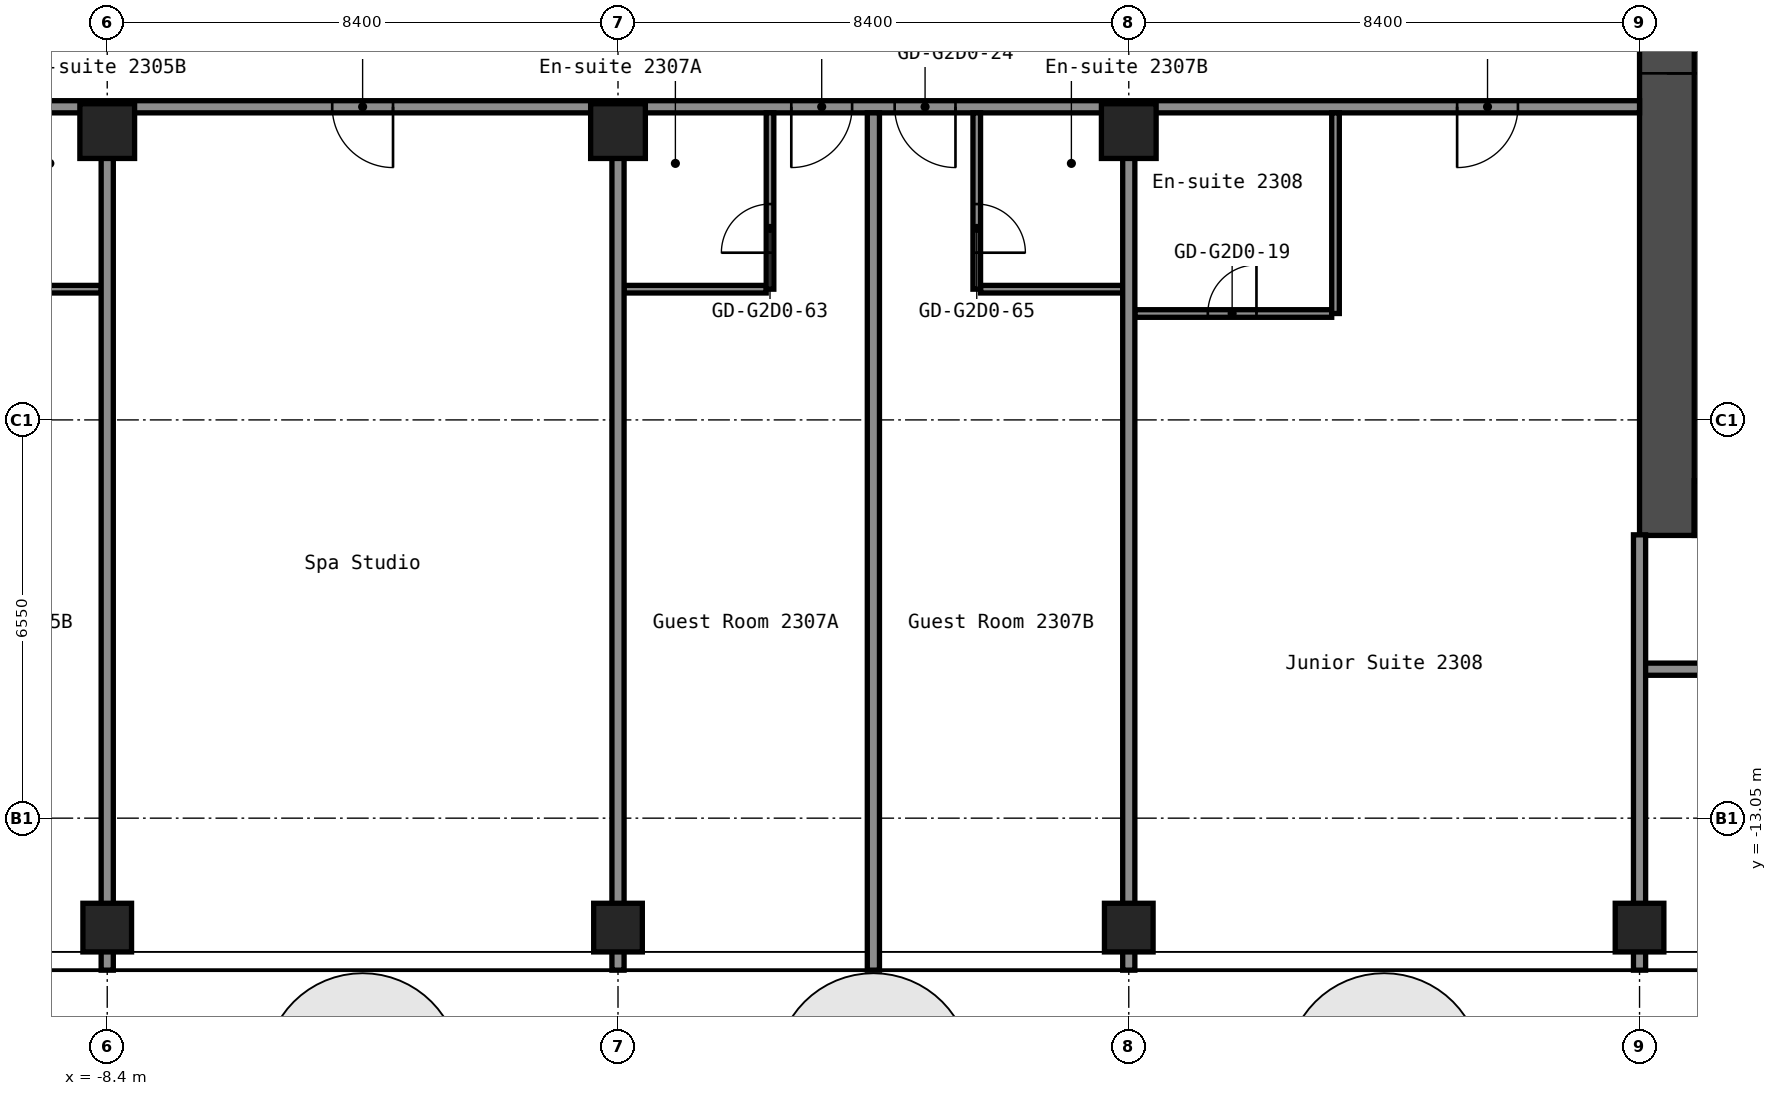
"""IFC4 building model, lengths in metres.
Left out: names, types, materials, properties, quantities, classifications, styles, units other than length and angle.
Written with IfcOpenShell. Run it as: python <this file> out.ifc"""

import sys

from ifc_helpers import new_model, si_unit, direction, frame, frame_2d, origin, origin_2d, place, context, subcontext, project, spatial, rectangle, hollow_rectangle, extrude, element, fill, save


model = new_model("IFC4")
c1 = context("Model", 3, precision=1e-05, world=origin(), true_north=direction((0.0, 1.0)))
c2 = subcontext(c1, "Body", "Model", "MODEL_VIEW")
j1 = project(units=[si_unit("LENGTHUNIT", "METRE"), si_unit("PLANEANGLEUNIT", "RADIAN")], contexts=[c1])
p1 = place(None, origin())
s1 = spatial("IfcSite", under=j1, at=p1, CompositionType="ELEMENT")
p2 = place(p1, origin())
s2 = spatial("IfcBuilding", under=s1, at=p2, CompositionType="ELEMENT")
p3 = place(p2, frame((0.0, 0.0, 85.0)))
s3 = spatial("IfcBuildingStorey", under=s2, at=p3, CompositionType="ELEMENT", Elevation=85.0)
p4 = place(p3, frame((-8.4, -14.85, 0.0), z_axis=(0.0, 0.0, 1.0), x_axis=(1.0, 0.0, 0.0)))
e1 = element("IfcColumn", 1, at=p4, inside=s3, PredefinedType="COLUMN", context=c2, shape_type="SweptSolid", body=[
    extrude(hollow_rectangle(XDim=0.8, YDim=0.8, WallThickness=0.032, at=origin_2d()), origin(), (0.0, 0.0, 1.0), 2.8),
])
p5 = place(p3, frame((-8.4, -1.75, 0.0), z_axis=(0.0, 0.0, 1.0), x_axis=(1.0, 0.0, 0.0)))
e2 = element("IfcColumn", 2, at=p5, inside=s3, PredefinedType="COLUMN", context=c2, shape_type="SweptSolid", body=[
    extrude(hollow_rectangle(XDim=0.9, YDim=0.9, WallThickness=0.036, at=origin_2d()), origin(), (0.0, 0.0, 1.0), 2.8),
])
p6 = place(p3, frame((0.0, -14.85, 0.0), z_axis=(0.0, 0.0, 1.0), x_axis=(1.0, 0.0, 0.0)))
e3 = element("IfcColumn", 3, at=p6, inside=s3, PredefinedType="COLUMN", context=c2, shape_type="SweptSolid", body=[
    extrude(hollow_rectangle(XDim=0.8, YDim=0.8, WallThickness=0.032, at=origin_2d()), origin(), (0.0, 0.0, 1.0), 2.8),
])
p7 = place(p3, frame((0.0, -1.75, 0.0), z_axis=(0.0, 0.0, 1.0), x_axis=(1.0, 0.0, 0.0)))
e4 = element("IfcColumn", 4, at=p7, inside=s3, PredefinedType="COLUMN", context=c2, shape_type="SweptSolid", body=[
    extrude(hollow_rectangle(XDim=0.9, YDim=0.9, WallThickness=0.036, at=origin_2d()), origin(), (0.0, 0.0, 1.0), 2.8),
])
p8 = place(p3, frame((8.4, -14.85, 0.0), z_axis=(0.0, 0.0, 1.0), x_axis=(1.0, 0.0, 0.0)))
e5 = element("IfcColumn", 5, at=p8, inside=s3, PredefinedType="COLUMN", context=c2, shape_type="SweptSolid", body=[
    extrude(hollow_rectangle(XDim=0.8, YDim=0.8, WallThickness=0.032, at=origin_2d()), origin(), (0.0, 0.0, 1.0), 2.8),
])
p9 = place(p3, frame((8.4, -1.75, 0.0), z_axis=(0.0, 0.0, 1.0), x_axis=(1.0, 0.0, 0.0)))
e6 = element("IfcColumn", 6, at=p9, inside=s3, PredefinedType="COLUMN", context=c2, shape_type="SweptSolid", body=[
    extrude(hollow_rectangle(XDim=0.9, YDim=0.9, WallThickness=0.036, at=origin_2d()), origin(), (0.0, 0.0, 1.0), 2.8),
])
p10 = place(p3, frame((16.8, -14.85, 0.0), z_axis=(0.0, 0.0, 1.0), x_axis=(1.0, 0.0, 0.0)))
e7 = element("IfcColumn", 7, at=p10, inside=s3, PredefinedType="COLUMN", context=c2, shape_type="SweptSolid", body=[
    extrude(hollow_rectangle(XDim=0.8, YDim=0.8, WallThickness=0.032, at=origin_2d()), origin(), (0.0, 0.0, 1.0), 2.8),
])
p11 = place(p3, frame((17.25, -8.4, 0.0), z_axis=(0.0, 0.0, 1.0), x_axis=(0.0, 1.0, 0.0)))
e8 = element("IfcWall", 8, at=p11, inside=s3, PredefinedType="SHEAR", context=c2, shape_type="SweptSolid", body=[
    extrude(rectangle(XDim=16.8, YDim=0.9, at=frame_2d((8.4, 0.0))), origin(), (0.0, 0.0, 1.0), 2.8),
])
p12 = place(p11, frame((7.6, 0.0, 0.0)))
e9 = element("IfcOpeningElement", 9, at=p12, cuts=e8, PredefinedType="OPENING", context=c2, shape_type="SweptSolid", body=[
    extrude(rectangle(XDim=1.2, YDim=2.1, at=frame_2d((0.6, 1.05))), frame((0.0, 0.46, 0.0), z_axis=(0.0, -1.0, 0.0), x_axis=(1.0, 0.0, 0.0)), (0.0, 0.0, 1.0), 0.92),
])
p13 = place(p3, frame((17.7, -7.95, 0.0), z_axis=(0.0, 0.0, 1.0), x_axis=(1.0, 0.0, 0.0)))
e10 = element("IfcWall", 10, at=p13, inside=s3, PredefinedType="SHEAR", context=c2, shape_type="SweptSolid", body=[
    extrude(rectangle(XDim=15.0, YDim=0.9, at=frame_2d((7.5, 0.0))), origin(), (0.0, 0.0, 1.0), 2.8),
])
p14 = place(p13, frame((2.55, 0.0, 0.0)))
e11 = element("IfcOpeningElement", 11, at=p14, cuts=e10, PredefinedType="OPENING", context=c2, shape_type="SweptSolid", body=[
    extrude(rectangle(XDim=1.0, YDim=2.1, at=frame_2d((0.5, 1.05))), frame((0.0, 0.46, 0.0), z_axis=(0.0, -1.0, 0.0), x_axis=(1.0, 0.0, 0.0)), (0.0, 0.0, 1.0), 0.92),
])
p15 = place(p3, frame((16.8, -10.6, 0.0), z_axis=(0.0, 0.0, 1.0), x_axis=(1.0, 0.0, 0.0)))
e12 = element("IfcWall", 12, at=p15, inside=s3, PredefinedType="PARTITIONING", context=c2, shape_type="SweptSolid", body=[
    extrude(rectangle(XDim=29.7, YDim=0.2, at=frame_2d((14.85, 0.0))), origin(), (0.0, 0.0, 1.0), 2.8),
])
p16 = place(p15, frame((1.82, 0.0, 0.0)))
e13 = element("IfcOpeningElement", 13, at=p16, cuts=e12, PredefinedType="OPENING", context=c2, shape_type="SweptSolid", body=[
    extrude(rectangle(XDim=0.9, YDim=2.1, at=frame_2d((0.45, 1.05))), frame((0.0, 0.11, 0.0), z_axis=(0.0, -1.0, 0.0), x_axis=(1.0, 0.0, 0.0)), (0.0, 0.0, 1.0), 0.22),
])
p17 = place(p15, frame((6.02, 0.0, 0.0)))
e14 = element("IfcOpeningElement", 14, at=p17, cuts=e12, PredefinedType="OPENING", context=c2, shape_type="SweptSolid", body=[
    extrude(rectangle(XDim=0.9, YDim=2.1, at=frame_2d((0.45, 1.05))), frame((0.0, 0.11, 0.0), z_axis=(0.0, -1.0, 0.0), x_axis=(1.0, 0.0, 0.0)), (0.0, 0.0, 1.0), 0.22),
])
p18 = place(p15, frame((10.3, 0.0, 0.0)))
e15 = element("IfcOpeningElement", 15, at=p18, cuts=e12, PredefinedType="OPENING", context=c2, shape_type="SweptSolid", body=[
    extrude(rectangle(XDim=0.9, YDim=2.1, at=frame_2d((0.45, 1.05))), frame((0.0, 0.11, 0.0), z_axis=(0.0, -1.0, 0.0), x_axis=(1.0, 0.0, 0.0)), (0.0, 0.0, 1.0), 0.22),
])
p19 = place(p15, frame((14.5, 0.0, 0.0)))
e16 = element("IfcOpeningElement", 16, at=p19, cuts=e12, PredefinedType="OPENING", context=c2, shape_type="SweptSolid", body=[
    extrude(rectangle(XDim=0.9, YDim=2.1, at=frame_2d((0.45, 1.05))), frame((0.0, 0.11, 0.0), z_axis=(0.0, -1.0, 0.0), x_axis=(1.0, 0.0, 0.0)), (0.0, 0.0, 1.0), 0.22),
])
p20 = place(p15, frame((18.03, 0.0, 0.0)))
e17 = element("IfcOpeningElement", 17, at=p20, cuts=e12, PredefinedType="OPENING", context=c2, shape_type="SweptSolid", body=[
    extrude(rectangle(XDim=0.9, YDim=2.1, at=frame_2d((0.45, 1.05))), frame((0.0, 0.11, 0.0), z_axis=(0.0, -1.0, 0.0), x_axis=(1.0, 0.0, 0.0)), (0.0, 0.0, 1.0), 0.22),
])
p21 = place(p15, frame((22.23, 0.0, 0.0)))
e18 = element("IfcOpeningElement", 18, at=p21, cuts=e12, PredefinedType="OPENING", context=c2, shape_type="SweptSolid", body=[
    extrude(rectangle(XDim=0.9, YDim=2.1, at=frame_2d((0.45, 1.05))), frame((0.0, 0.11, 0.0), z_axis=(0.0, -1.0, 0.0), x_axis=(1.0, 0.0, 0.0)), (0.0, 0.0, 1.0), 0.22),
])
p22 = place(p15, frame((26.85, 0.0, 0.0)))
e19 = element("IfcOpeningElement", 19, at=p22, cuts=e12, PredefinedType="OPENING", context=c2, shape_type="SweptSolid", body=[
    extrude(rectangle(XDim=0.9, YDim=2.1, at=frame_2d((0.45, 1.05))), frame((0.0, 0.11, 0.0), z_axis=(0.0, -1.0, 0.0), x_axis=(1.0, 0.0, 0.0)), (0.0, 0.0, 1.0), 0.22),
])
p23 = place(p3, frame((8.5, -4.75, 0.0), z_axis=(0.0, 0.0, 1.0), x_axis=(1.0, 0.0, 0.0)))
e20 = element("IfcWall", 20, at=p23, inside=s3, PredefinedType="PARTITIONING", context=c2, shape_type="SweptSolid", body=[
    extrude(rectangle(XDim=3.238, YDim=0.125, at=frame_2d((1.619, 0.0))), origin(), (0.0, 0.0, 1.0), 2.8),
])
p24 = place(p23, frame((1.2, 0.0, 0.0)))
e21 = element("IfcOpeningElement", 21, at=p24, cuts=e20, PredefinedType="OPENING", context=c2, shape_type="SweptSolid", body=[
    extrude(rectangle(XDim=0.8, YDim=2.1, at=frame_2d((0.4, 1.05))), frame((0.0, 0.073, 0.0), z_axis=(0.0, -1.0, 0.0), x_axis=(1.0, 0.0, 0.0)), (0.0, 0.0, 1.0), 0.145),
])
for number, where, z_axis, x_axis in (
    (22, (-10.837, -4.35, 0.0), (0.0, 0.0, 1.0), (1.0, 0.0, 0.0)),
    (23, (0.1, -4.35, 0.0), (0.0, 0.0, 1.0), (1.0, 0.0, 0.0)),
):
    element("IfcWall", number, at=place(p3, frame(where, z_axis=z_axis, x_axis=x_axis)), inside=s3, PredefinedType="PARTITIONING", context=c2, shape_type="SweptSolid", body=[
        extrude(rectangle(XDim=2.337, YDim=0.125, at=frame_2d((1.169, 0.0))), origin(), (0.0, 0.0, 1.0), 2.8),
    ])
p25 = place(p3, frame((5.962, -4.35, 0.0), z_axis=(0.0, 0.0, 1.0), x_axis=(1.0, 0.0, 0.0)))
e24 = element("IfcWall", 24, at=p25, inside=s3, PredefinedType="PARTITIONING", context=c2, shape_type="SweptSolid", body=[
    extrude(rectangle(XDim=2.338, YDim=0.125, at=frame_2d((1.169, 0.0))), origin(), (0.0, 0.0, 1.0), 2.8),
])
p26 = place(p3, frame((-16.8, -1.35, 0.0), z_axis=(0.0, 0.0, 1.0), x_axis=(1.0, 0.0, 0.0)))
e25 = element("IfcWall", 25, at=p26, inside=s3, PredefinedType="PARTITIONING", context=c2, shape_type="SweptSolid", body=[
    extrude(rectangle(XDim=33.6, YDim=0.2, at=frame_2d((16.8, 0.0))), origin(), (0.0, 0.0, 1.0), 2.8),
])
p27 = place(p26, frame((2.85, 0.0, 0.0)))
e26 = element("IfcOpeningElement", 26, at=p27, cuts=e25, PredefinedType="OPENING", context=c2, shape_type="SweptSolid", body=[
    extrude(rectangle(XDim=1.0, YDim=2.1, at=frame_2d((0.5, 1.05))), frame((0.0, 0.11, 0.0), z_axis=(0.0, -1.0, 0.0), x_axis=(1.0, 0.0, 0.0)), (0.0, 0.0, 1.0), 0.22),
])
p28 = place(p26, frame((4.55, 0.0, 0.0)))
e27 = element("IfcOpeningElement", 27, at=p28, cuts=e25, PredefinedType="OPENING", context=c2, shape_type="SweptSolid", body=[
    extrude(rectangle(XDim=1.0, YDim=2.1, at=frame_2d((0.5, 1.05))), frame((0.0, 0.11, 0.0), z_axis=(0.0, -1.0, 0.0), x_axis=(1.0, 0.0, 0.0)), (0.0, 0.0, 1.0), 0.22),
])
p29 = place(p26, frame((12.1, 0.0, 0.0)))
e28 = element("IfcOpeningElement", 28, at=p29, cuts=e25, PredefinedType="OPENING", context=c2, shape_type="SweptSolid", body=[
    extrude(rectangle(XDim=1.0, YDim=2.1, at=frame_2d((0.5, 1.05))), frame((0.0, 0.11, 0.0), z_axis=(0.0, -1.0, 0.0), x_axis=(1.0, 0.0, 0.0)), (0.0, 0.0, 1.0), 0.22),
])
p30 = place(p26, frame((19.65, 0.0, 0.0)))
e29 = element("IfcOpeningElement", 29, at=p30, cuts=e25, PredefinedType="OPENING", context=c2, shape_type="SweptSolid", body=[
    extrude(rectangle(XDim=1.0, YDim=2.1, at=frame_2d((0.5, 1.05))), frame((0.0, 0.11, 0.0), z_axis=(0.0, -1.0, 0.0), x_axis=(1.0, 0.0, 0.0)), (0.0, 0.0, 1.0), 0.22),
])
p31 = place(p26, frame((21.35, 0.0, 0.0)))
e30 = element("IfcOpeningElement", 30, at=p31, cuts=e25, PredefinedType="OPENING", context=c2, shape_type="SweptSolid", body=[
    extrude(rectangle(XDim=1.0, YDim=2.1, at=frame_2d((0.5, 1.05))), frame((0.0, 0.11, 0.0), z_axis=(0.0, -1.0, 0.0), x_axis=(1.0, 0.0, 0.0)), (0.0, 0.0, 1.0), 0.22),
])
p32 = place(p26, frame((30.6, 0.0, 0.0)))
e31 = element("IfcOpeningElement", 31, at=p32, cuts=e25, PredefinedType="OPENING", context=c2, shape_type="SweptSolid", body=[
    extrude(rectangle(XDim=1.0, YDim=2.1, at=frame_2d((0.5, 1.05))), frame((0.0, 0.11, 0.0), z_axis=(0.0, -1.0, 0.0), x_axis=(1.0, 0.0, 0.0)), (0.0, 0.0, 1.0), 0.22),
])
for number, where, z_axis, x_axis in (
    (32, (-8.4, -15.55, 0.0), (0.0, 0.0, 1.0), (0.0, 1.0, 0.0)),
    (33, (0.0, -15.55, 0.0), (0.0, 0.0, 1.0), (0.0, 1.0, 0.0)),
):
    element("IfcWall", number, at=place(p3, frame(where, z_axis=z_axis, x_axis=x_axis)), inside=s3, PredefinedType="PARTITIONING", context=c2, shape_type="SweptSolid", body=[
        extrude(rectangle(XDim=13.36, YDim=0.2, at=frame_2d((6.68, 0.0))), origin(), (0.0, 0.0, 1.0), 2.8),
    ])
p33 = place(p3, frame((2.5, -4.35, 0.0), z_axis=(0.0, 0.0, 1.0), x_axis=(0.0, 1.0, 0.0)))
e34 = element("IfcWall", 34, at=p33, inside=s3, PredefinedType="PARTITIONING", context=c2, shape_type="SweptSolid", body=[
    extrude(rectangle(XDim=2.9, YDim=0.125, at=frame_2d((1.45, 0.0))), origin(), (0.0, 0.0, 1.0), 2.8),
])
p34 = place(p33, frame((0.6, 0.0, 0.0)))
e35 = element("IfcOpeningElement", 35, at=p34, cuts=e34, PredefinedType="OPENING", context=c2, shape_type="SweptSolid", body=[
    extrude(rectangle(XDim=0.8, YDim=2.1, at=frame_2d((0.4, 1.05))), frame((0.0, 0.073, 0.0), z_axis=(0.0, -1.0, 0.0), x_axis=(1.0, 0.0, 0.0)), (0.0, 0.0, 1.0), 0.145),
])
p35 = place(p3, frame((4.2, -15.55, 0.0), z_axis=(0.0, 0.0, 1.0), x_axis=(0.0, 1.0, 0.0)))
e36 = element("IfcWall", 36, at=p35, inside=s3, PredefinedType="PARTITIONING", context=c2, shape_type="SweptSolid", body=[
    extrude(rectangle(XDim=14.1, YDim=0.2, at=frame_2d((7.05, 0.0))), origin(), (0.0, 0.0, 1.0), 2.8),
])
p36 = place(p3, frame((5.9, -4.35, 0.0), z_axis=(0.0, 0.0, 1.0), x_axis=(0.0, 1.0, 0.0)))
e37 = element("IfcWall", 37, at=p36, inside=s3, PredefinedType="PARTITIONING", context=c2, shape_type="SweptSolid", body=[
    extrude(rectangle(XDim=2.9, YDim=0.125, at=frame_2d((1.45, 0.0))), origin(), (0.0, 0.0, 1.0), 2.8),
])
p37 = place(p36, frame((0.6, 0.0, 0.0)))
e38 = element("IfcOpeningElement", 38, at=p37, cuts=e37, PredefinedType="OPENING", context=c2, shape_type="SweptSolid", body=[
    extrude(rectangle(XDim=0.8, YDim=2.1, at=frame_2d((0.4, 1.05))), frame((0.0, 0.073, 0.0), z_axis=(0.0, -1.0, 0.0), x_axis=(1.0, 0.0, 0.0)), (0.0, 0.0, 1.0), 0.145),
])
p38 = place(p3, frame((8.4, -15.55, 0.0), z_axis=(0.0, 0.0, 1.0), x_axis=(0.0, 1.0, 0.0)))
e39 = element("IfcWall", 39, at=p38, inside=s3, PredefinedType="PARTITIONING", context=c2, shape_type="SweptSolid", body=[
    extrude(rectangle(XDim=13.36, YDim=0.2, at=frame_2d((6.68, 0.0))), origin(), (0.0, 0.0, 1.0), 2.8),
])
p39 = place(p3, frame((11.8, -4.75, 0.0), z_axis=(0.0, 0.0, 1.0), x_axis=(0.0, 1.0, 0.0)))
e40 = element("IfcWall", 40, at=p39, inside=s3, PredefinedType="PARTITIONING", context=c2, shape_type="SweptSolid", body=[
    extrude(rectangle(XDim=3.3, YDim=0.125, at=frame_2d((1.65, 0.0))), origin(), (0.0, 0.0, 1.0), 2.8),
])
p40 = place(p3, frame((16.8, -15.55, 0.0), z_axis=(0.0, 0.0, 1.0), x_axis=(0.0, 1.0, 0.0)))
e41 = element("IfcWall", 41, at=p40, inside=s3, PredefinedType="PARTITIONING", context=c2, shape_type="SweptSolid", body=[
    extrude(rectangle(XDim=7.16, YDim=0.2, at=frame_2d((3.58, 0.0))), origin(), (0.0, 0.0, 1.0), 2.8),
])
p41 = place(p12, origin())
e42 = element("IfcDoor", 42, at=p41, inside=s3, OperationType="DOUBLE_DOOR_SINGLE_SWING", PredefinedType="DOOR", context=c2, shape_type="SweptSolid", body=[
    extrude(rectangle(XDim=1.2, YDim=2.1, at=frame_2d((0.6, 1.05))), frame((0.0, 0.025, 0.0), z_axis=(0.0, -1.0, 0.0), x_axis=(1.0, 0.0, 0.0)), (0.0, 0.0, 1.0), 0.05),
])
fill(e9, e42)
p42 = place(p24, origin())
e43 = element("IfcDoor", 43, at=p42, inside=s3, OperationType="SINGLE_SWING_LEFT", PredefinedType="DOOR", context=c2, shape_type="SweptSolid", body=[
    extrude(rectangle(XDim=0.8, YDim=2.1, at=frame_2d((0.4, 1.05))), frame((0.0, 0.025, 0.0), z_axis=(0.0, -1.0, 0.0), x_axis=(1.0, 0.0, 0.0)), (0.0, 0.0, 1.0), 0.05),
])
fill(e21, e43)
p43 = place(p29, origin())
e44 = element("IfcDoor", 44, at=p43, inside=s3, OperationType="SINGLE_SWING_RIGHT", PredefinedType="DOOR", context=c2, shape_type="SweptSolid", body=[
    extrude(rectangle(XDim=1.0, YDim=2.1, at=frame_2d((0.5, 1.05))), frame((0.0, 0.025, 0.0), z_axis=(0.0, -1.0, 0.0), x_axis=(1.0, 0.0, 0.0)), (0.0, 0.0, 1.0), 0.05),
])
fill(e28, e44)
p44 = place(p30, origin())
e45 = element("IfcDoor", 45, at=p44, inside=s3, OperationType="SINGLE_SWING_LEFT", PredefinedType="DOOR", context=c2, shape_type="SweptSolid", body=[
    extrude(rectangle(XDim=1.0, YDim=2.1, at=frame_2d((0.5, 1.05))), frame((0.0, 0.025, 0.0), z_axis=(0.0, -1.0, 0.0), x_axis=(1.0, 0.0, 0.0)), (0.0, 0.0, 1.0), 0.05),
])
fill(e29, e45)
p45 = place(p31, origin())
e46 = element("IfcDoor", 46, at=p45, inside=s3, OperationType="SINGLE_SWING_RIGHT", PredefinedType="DOOR", context=c2, shape_type="SweptSolid", body=[
    extrude(rectangle(XDim=1.0, YDim=2.1, at=frame_2d((0.5, 1.05))), frame((0.0, 0.025, 0.0), z_axis=(0.0, -1.0, 0.0), x_axis=(1.0, 0.0, 0.0)), (0.0, 0.0, 1.0), 0.05),
])
fill(e30, e46)
p46 = place(p32, origin())
e47 = element("IfcDoor", 47, at=p46, inside=s3, OperationType="SINGLE_SWING_LEFT", PredefinedType="DOOR", context=c2, shape_type="SweptSolid", body=[
    extrude(rectangle(XDim=1.0, YDim=2.1, at=frame_2d((0.5, 1.05))), frame((0.0, 0.025, 0.0), z_axis=(0.0, -1.0, 0.0), x_axis=(1.0, 0.0, 0.0)), (0.0, 0.0, 1.0), 0.05),
])
fill(e31, e47)
p47 = place(p34, origin())
e48 = element("IfcDoor", 48, at=p47, inside=s3, OperationType="SINGLE_SWING_RIGHT", PredefinedType="DOOR", context=c2, shape_type="SweptSolid", body=[
    extrude(rectangle(XDim=0.8, YDim=2.1, at=frame_2d((0.4, 1.05))), frame((0.0, 0.025, 0.0), z_axis=(0.0, -1.0, 0.0), x_axis=(1.0, 0.0, 0.0)), (0.0, 0.0, 1.0), 0.05),
])
fill(e35, e48)
p48 = place(p37, origin())
e49 = element("IfcDoor", 49, at=p48, inside=s3, OperationType="SINGLE_SWING_LEFT", PredefinedType="DOOR", context=c2, shape_type="SweptSolid", body=[
    extrude(rectangle(XDim=0.8, YDim=2.1, at=frame_2d((0.4, 1.05))), frame((0.0, 0.025, 0.0), z_axis=(0.0, -1.0, 0.0), x_axis=(1.0, 0.0, 0.0)), (0.0, 0.0, 1.0), 0.05),
])
fill(e38, e49)
save(model, sys.argv[1])
